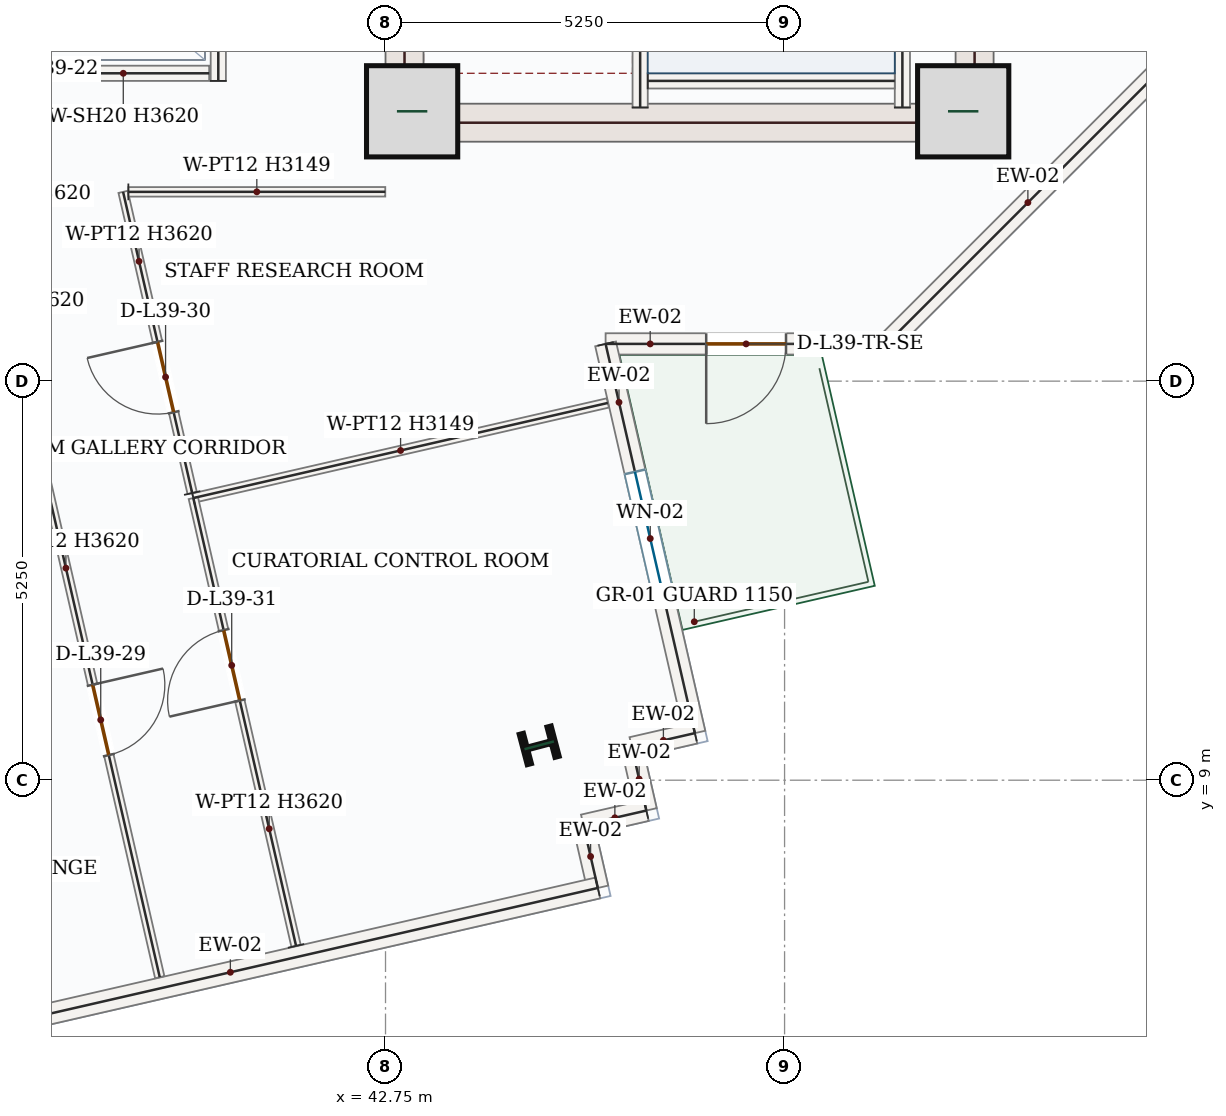
"""IFC4 building model, lengths in metres.
Left out: names, types, materials, properties, quantities, classifications, styles, units other than length and angle.
Written with IfcOpenShell. Run it as: python <this file> out.ifc"""

import sys

from ifc_helpers import new_model, si_unit, direction, frame, frame_2d, origin, origin_2d, place, context, subcontext, project, spatial, rectangle, i_section, extrude, source, transform, mapped, element, fill, save


model = new_model("IFC4")
c1 = context("Model", 3, precision=1e-05, world=origin(), true_north=direction((0.0, 1.0)))
c2 = subcontext(c1, "Body", "Model", "MODEL_VIEW")
j1 = project(units=[si_unit("LENGTHUNIT", "METRE"), si_unit("PLANEANGLEUNIT", "RADIAN")], contexts=[c1])
p1 = place(None, origin())
s1 = spatial("IfcSite", under=j1, at=p1, CompositionType="ELEMENT")
p2 = place(p1, origin())
s2 = spatial("IfcBuilding", under=s1, at=p2, CompositionType="ELEMENT")
p3 = place(p2, frame((0.0, 0.0, 170.7)))
s3 = spatial("IfcBuildingStorey", under=s2, at=p3, CompositionType="ELEMENT", Elevation=170.7)
p4 = place(p3, frame((43.0, 17.4, 0.0), z_axis=(0.0, 0.0, 1.0), x_axis=(0.0, 1.0, 0.0)))
e1 = element("IfcWall", 1, at=p4, inside=s3, PredefinedType="SHEAR", context=c2, shape_type="SweptSolid", body=[
    extrude(rectangle(XDim=8.55, YDim=0.5, at=frame_2d((4.275, 0.0))), origin(), (0.0, 0.0, 1.0), 3.62),
])
p5 = place(p4, frame((6.65, 0.0, 0.0)))
e2 = element("IfcOpeningElement", 2, at=p5, cuts=e1, PredefinedType="OPENING", context=c2, shape_type="SweptSolid", body=[
    extrude(rectangle(XDim=1.1, YDim=2.2, at=frame_2d((0.55, 1.1))), frame((0.0, 0.26, 0.0), z_axis=(0.0, -1.0, 0.0), x_axis=(1.0, 0.0, 0.0)), (0.0, 0.0, 1.0), 0.52),
])
p6 = place(p4, frame((1.75, 0.0, 0.0)))
e3 = element("IfcOpeningElement", 3, at=p6, cuts=e1, PredefinedType="OPENING", context=c2, shape_type="SweptSolid", body=[
    extrude(rectangle(XDim=1.3, YDim=2.2, at=frame_2d((0.65, 1.1))), frame((0.0, 0.26, 0.0), z_axis=(0.0, -1.0, 0.0), x_axis=(1.0, 0.0, 0.0)), (0.0, 0.0, 1.0), 0.52),
])
p7 = place(p4, frame((4.3, 0.0, 0.0)))
e4 = element("IfcOpeningElement", 4, at=p7, cuts=e1, PredefinedType="OPENING", context=c2, shape_type="SweptSolid", body=[
    extrude(rectangle(XDim=0.88, YDim=2.1, at=frame_2d((0.44, 1.05))), frame((0.0, 0.26, 0.0), z_axis=(0.0, -1.0, 0.0), x_axis=(1.0, 0.0, 0.0)), (0.0, 0.0, 1.0), 0.52),
])
m1 = source(origin(), c2, "Body", "SweptSolid", [
    extrude(rectangle(XDim=8.55, YDim=0.5, at=frame_2d((4.275, 0.0))), origin(), (0.0, 0.0, 1.0), 3.62),
])
p8 = place(p3, frame((50.5, 17.4, 0.0), z_axis=(0.0, 0.0, 1.0), x_axis=(0.0, 1.0, 0.0)))
e5 = element("IfcWall", 5, at=p8, inside=s3, PredefinedType="SHEAR", context=c2, shape_type="MappedRepresentation", body=[
    mapped(m1, transform((0.0, 0.0, 0.0), x_axis=(1.0, 0.0, 0.0), y_axis=(0.0, 1.0, 0.0), z_axis=(0.0, 0.0, 1.0), scale=1.0)),
])
m2 = source(origin(), c2, "Body", "SweptSolid", [
    extrude(rectangle(XDim=7.0, YDim=0.5, at=frame_2d((3.5, 0.0))), origin(), (0.0, 0.0, 1.0), 3.62),
])
p9 = place(p3, frame((43.25, 17.65, 0.0), z_axis=(0.0, 0.0, 1.0), x_axis=(1.0, 0.0, 0.0)))
e6 = element("IfcWall", 6, at=p9, inside=s3, PredefinedType="SHEAR", context=c2, shape_type="MappedRepresentation", body=[
    mapped(m2, transform((0.0, 0.0, 0.0), x_axis=(1.0, 0.0, 0.0), y_axis=(0.0, 1.0, 0.0), z_axis=(0.0, 0.0, 1.0), scale=1.0)),
])
m3 = source(origin(), c2, "Body", "SweptSolid", [
    extrude(rectangle(XDim=1.2, YDim=1.2, at=origin_2d()), origin(), (0.0, 0.0, 1.0), 3.9),
])
for number, where, z_axis, x_axis in (
    (7, (43.1, 17.8, 0.0), (0.0, 0.0, 1.0), (1.0, 0.0, 0.0)),
    (8, (50.35, 17.8, 0.0), (0.0, 0.0, 1.0), (1.0, 0.0, 0.0)),
):
    element("IfcColumn", number, at=place(p3, frame(where, z_axis=z_axis, x_axis=x_axis)), inside=s3, PredefinedType="COLUMN", context=c2, shape_type="MappedRepresentation", body=[
        mapped(m3, transform((0.0, 0.0, 0.0), x_axis=(1.0, 0.0, 0.0), y_axis=(0.0, 1.0, 0.0), z_axis=(0.0, 0.0, 1.0), scale=1.0)),
    ])
m4 = source(origin(), c2, "Body", "SweptSolid", [
    extrude(i_section(OverallWidth=0.412, OverallDepth=0.435, WebThickness=0.036, FlangeThickness=0.057, FilletRadius=0.018, at=origin_2d()), origin(), (0.0, 0.0, 1.0), 3.9),
])
p10 = place(p3, frame((44.772, 9.459, 0.0), z_axis=(0.0, 0.0, 1.0), x_axis=(-0.255445757936, 0.966823388604, 0.0)))
e9 = element("IfcColumn", 9, at=p10, inside=s3, PredefinedType="COLUMN", context=c2, shape_type="MappedRepresentation", body=[
    mapped(m4, transform((0.0, 0.0, 0.0), x_axis=(1.0, 0.0, 0.0), y_axis=(0.0, 1.0, 0.0), z_axis=(0.0, 0.0, 1.0), scale=1.0)),
])
m5 = source(origin(), c2, "Body", "SweptSolid", [
    extrude(rectangle(XDim=5.258, YDim=0.28, at=frame_2d((2.629, 0.0))), origin(), (0.0, 0.0, 1.0), 3.62),
])
p11 = place(p3, frame((53.06, 18.458, 0.0), z_axis=(0.0, 0.0, 1.0), x_axis=(-0.707106781187, -0.707106781187, 0.0)))
e10 = element("IfcWall", 10, at=p11, inside=s3, PredefinedType="SOLIDWALL", context=c2, shape_type="MappedRepresentation", body=[
    mapped(m5, transform((0.0, 0.0, 0.0), x_axis=(1.0, 0.0, 0.0), y_axis=(0.0, 1.0, 0.0), z_axis=(0.0, 0.0, 1.0), scale=1.0)),
])
p12 = place(p3, frame((49.342, 14.74, 0.0), z_axis=(0.0, 0.0, 1.0), x_axis=(-1.0, 0.0, 0.0)))
e11 = element("IfcWall", 11, at=p12, inside=s3, PredefinedType="SOLIDWALL", context=c2, shape_type="SweptSolid", body=[
    extrude(rectangle(XDim=3.697, YDim=0.28, at=frame_2d((1.848, 0.0))), origin(), (0.0, 0.0, 1.0), 3.62),
])
p13 = place(p12, frame((1.323, 0.0, 0.0)))
e12 = element("IfcOpeningElement", 12, at=p13, cuts=e11, PredefinedType="OPENING", context=c2, shape_type="SweptSolid", body=[
    extrude(rectangle(XDim=1.05, YDim=2.15, at=frame_2d((0.525, 1.075))), frame((0.0, 0.15, 0.0), z_axis=(0.0, -1.0, 0.0), x_axis=(1.0, 0.0, 0.0)), (0.0, 0.0, 1.0), 0.3),
])
p14 = place(p3, frame((45.646, 14.74, 0.0), z_axis=(0.0, 0.0, 1.0), x_axis=(0.223562871808, -0.974689510741, 0.0)))
e13 = element("IfcWall", 13, at=p14, inside=s3, PredefinedType="SOLIDWALL", context=c2, shape_type="SweptSolid", body=[
    extrude(rectangle(XDim=5.254, YDim=0.28, at=frame_2d((2.627, 0.0))), origin(), (0.0, 0.0, 1.0), 3.62),
])
p15 = place(p14, frame((1.727, 0.0, 0.85)))
e14 = element("IfcOpeningElement", 14, at=p15, cuts=e13, PredefinedType="OPENING", context=c2, shape_type="SweptSolid", body=[
    extrude(rectangle(XDim=1.8, YDim=1.75, at=frame_2d((0.9, 0.875))), frame((0.0, 0.15, 0.0), z_axis=(0.0, -1.0, 0.0), x_axis=(1.0, 0.0, 0.0)), (0.0, 0.0, 1.0), 0.3),
])
m6 = source(origin(), c2, "Body", "SweptSolid", [
    extrude(rectangle(XDim=0.85, YDim=0.28, at=frame_2d((0.425, 0.0))), origin(), (0.0, 0.0, 1.0), 3.62),
])
p16 = place(p3, frame((46.82, 9.619, 0.0), z_axis=(0.0, 0.0, 1.0), x_axis=(-0.974704946586, -0.223495563939, 0.0)))
e15 = element("IfcWall", 15, at=p16, inside=s3, PredefinedType="SOLIDWALL", context=c2, shape_type="MappedRepresentation", body=[
    mapped(m6, transform((0.0, 0.0, 0.0), x_axis=(1.0, 0.0, 0.0), y_axis=(0.0, 1.0, 0.0), z_axis=(0.0, 0.0, 1.0), scale=1.0)),
])
m7 = source(origin(), c2, "Body", "SweptSolid", [
    extrude(rectangle(XDim=0.85, YDim=0.28, at=frame_2d((0.425, 0.0))), origin(), (0.0, 0.0, 1.0), 3.62),
])
for number, where, z_axis, x_axis in (
    (16, (45.992, 9.429, 0.0), (0.0, 0.0, 1.0), (0.223, -0.975, 0.0)),
    (17, (46.182, 8.601, 0.0), (0.0, 0.0, 1.0), (-0.975, -0.223, 0.0)),
):
    element("IfcWall", number, at=place(p3, frame(where, z_axis=z_axis, x_axis=x_axis)), inside=s3, PredefinedType="SOLIDWALL", context=c2, shape_type="MappedRepresentation", body=[
        mapped(m7, transform((0.0, 0.0, 0.0), x_axis=(1.0, 0.0, 0.0), y_axis=(0.0, 1.0, 0.0), z_axis=(0.0, 0.0, 1.0), scale=1.0)),
    ])
p17 = place(p3, frame((45.353, 8.411, 0.0), z_axis=(0.0, 0.0, 1.0), x_axis=(0.223768457828, -0.974642333003, 0.0)))
e18 = element("IfcWall", 18, at=p17, inside=s3, PredefinedType="SOLIDWALL", context=c2, shape_type="MappedRepresentation", body=[
    mapped(m6, transform((0.0, 0.0, 0.0), x_axis=(1.0, 0.0, 0.0), y_axis=(0.0, 1.0, 0.0), z_axis=(0.0, 0.0, 1.0), scale=1.0)),
])
m8 = source(origin(), c2, "Body", "SweptSolid", [
    extrude(rectangle(XDim=9.92, YDim=0.28, at=frame_2d((4.96, 0.0))), origin(), (0.0, 0.0, 1.0), 3.62),
])
p18 = place(p3, frame((45.543, 7.582, 0.0), z_axis=(0.0, 0.0, 1.0), x_axis=(-0.974682391567, -0.223593907719, 0.0)))
e19 = element("IfcWall", 19, at=p18, inside=s3, PredefinedType="SOLIDWALL", context=c2, shape_type="MappedRepresentation", body=[
    mapped(m8, transform((0.0, 0.0, 0.0), x_axis=(1.0, 0.0, 0.0), y_axis=(0.0, 1.0, 0.0), z_axis=(0.0, 0.0, 1.0), scale=1.0)),
])
m9 = source(origin(), c2, "Body", "SweptSolid", [
    extrude(rectangle(XDim=7.87, YDim=0.2, at=frame_2d((3.935, 0.0))), origin(), (0.0, 0.0, 1.0), 3.62),
])
p19 = place(p3, frame((49.55, 17.85, 0.0), z_axis=(0.0, 0.0, 1.0), x_axis=(0.0, 1.0, 0.0)))
e20 = element("IfcWall", 20, at=p19, inside=s3, PredefinedType="SOLIDWALL", context=c2, shape_type="MappedRepresentation", body=[
    mapped(m9, transform((0.0, 0.0, 0.0), x_axis=(1.0, 0.0, 0.0), y_axis=(0.0, 1.0, 0.0), z_axis=(0.0, 0.0, 1.0), scale=1.0)),
])
p20 = place(p3, frame((46.1, 17.85, 0.0), z_axis=(0.0, 0.0, 1.0), x_axis=(0.0, 1.0, 0.0)))
e21 = element("IfcWall", 21, at=p20, inside=s3, PredefinedType="SOLIDWALL", context=c2, shape_type="SweptSolid", body=[
    extrude(rectangle(XDim=8.0, YDim=0.2, at=frame_2d((4.0, 0.0))), origin(), (0.0, 0.0, 1.0), 3.62),
])
p21 = place(p20, frame((6.3, 0.0, 0.0)))
e22 = element("IfcOpeningElement", 22, at=p21, cuts=e21, PredefinedType="OPENING", context=c2, shape_type="SweptSolid", body=[
    extrude(rectangle(XDim=1.05, YDim=2.15, at=frame_2d((0.525, 1.075))), frame((0.0, 0.11, 0.0), z_axis=(0.0, -1.0, 0.0), x_axis=(1.0, 0.0, 0.0)), (0.0, 0.0, 1.0), 0.22),
])
m10 = source(origin(), c2, "Body", "SweptSolid", [
    extrude(rectangle(XDim=3.25, YDim=0.2, at=frame_2d((1.625, 0.0))), origin(), (0.0, 0.0, 1.0), 3.62),
])
p22 = place(p3, frame((46.2, 18.2, 0.0), z_axis=(0.0, 0.0, 1.0), x_axis=(1.0, 0.0, 0.0)))
e23 = element("IfcWall", 23, at=p22, inside=s3, PredefinedType="SOLIDWALL", context=c2, shape_type="MappedRepresentation", body=[
    mapped(m10, transform((0.0, 0.0, 0.0), x_axis=(1.0, 0.0, 0.0), y_axis=(0.0, 1.0, 0.0), z_axis=(0.0, 0.0, 1.0), scale=1.0)),
])
p23 = place(p3, frame((40.55, 18.2, 0.0), z_axis=(0.0, 0.0, 1.0), x_axis=(0.0, 1.0, 0.0)))
e24 = element("IfcWall", 24, at=p23, inside=s3, PredefinedType="SOLIDWALL", context=c2, shape_type="SweptSolid", body=[
    extrude(rectangle(XDim=2.35, YDim=0.2, at=frame_2d((1.175, 0.0))), origin(), (0.0, 0.0, 1.0), 3.62),
])
p24 = place(p23, frame((0.625, 0.0, 0.0)))
e25 = element("IfcOpeningElement", 25, at=p24, cuts=e24, PredefinedType="OPENING", context=c2, shape_type="SweptSolid", body=[
    extrude(rectangle(XDim=1.1, YDim=2.15, at=frame_2d((0.55, 1.075))), frame((0.0, 0.11, 0.0), z_axis=(0.0, -1.0, 0.0), x_axis=(1.0, 0.0, 0.0)), (0.0, 0.0, 1.0), 0.22),
])
m11 = source(origin(), c2, "Body", "SweptSolid", [
    extrude(rectangle(XDim=2.26, YDim=0.2, at=frame_2d((1.13, 0.0))), origin(), (0.0, 0.0, 1.0), 3.62),
])
p25 = place(p3, frame((38.17, 18.3, 0.0), z_axis=(0.0, 0.0, 1.0), x_axis=(1.0, 0.0, 0.0)))
e26 = element("IfcWall", 26, at=p25, inside=s3, PredefinedType="SOLIDWALL", context=c2, shape_type="MappedRepresentation", body=[
    mapped(m11, transform((0.0, 0.0, 0.0), x_axis=(1.0, 0.0, 0.0), y_axis=(0.0, 1.0, 0.0), z_axis=(0.0, 0.0, 1.0), scale=1.0)),
])
m12 = source(origin(), c2, "Body", "SweptSolid", [
    extrude(rectangle(XDim=5.595, YDim=0.125, at=frame_2d((2.797, 0.0))), origin(), (0.0, 0.0, 1.0), 3.149),
])
p26 = place(p3, frame((40.221, 12.712, 0.0), z_axis=(0.0, 0.0, 1.0), x_axis=(0.974683801791, 0.223587760235, 0.0)))
e27 = element("IfcWall", 27, at=p26, inside=s3, PredefinedType="PARTITIONING", context=c2, shape_type="MappedRepresentation", body=[
    mapped(m12, transform((0.0, 0.0, 0.0), x_axis=(1.0, 0.0, 0.0), y_axis=(0.0, 1.0, 0.0), z_axis=(0.0, 0.0, 1.0), scale=1.0)),
])
p27 = place(p3, frame((41.573, 6.82, 0.0), z_axis=(0.0, 0.0, 1.0), x_axis=(-0.223588000718, 0.974683746625, 0.0)))
e28 = element("IfcWall", 28, at=p27, inside=s3, PredefinedType="PARTITIONING", context=c2, shape_type="SweptSolid", body=[
    extrude(rectangle(XDim=6.045, YDim=0.125, at=frame_2d((3.022, 0.0))), origin(), (0.0, 0.0, 1.0), 3.62),
])
p28 = place(p27, frame((3.312, 0.0, 0.0)))
e29 = element("IfcOpeningElement", 29, at=p28, cuts=e28, PredefinedType="OPENING", context=c2, shape_type="SweptSolid", body=[
    extrude(rectangle(XDim=0.95, YDim=2.15, at=frame_2d((0.475, 1.075))), frame((0.0, 0.073, 0.0), z_axis=(0.0, -1.0, 0.0), x_axis=(1.0, 0.0, 0.0)), (0.0, 0.0, 1.0), 0.145),
])
p29 = place(p3, frame((40.206, 12.778, 0.0), z_axis=(0.0, 0.0, 1.0), x_axis=(-0.223552104445, 0.97469198037, 0.0)))
e30 = element("IfcWall", 30, at=p29, inside=s3, PredefinedType="PARTITIONING", context=c2, shape_type="SweptSolid", body=[
    extrude(rectangle(XDim=4.065, YDim=0.125, at=frame_2d((2.032, 0.0))), origin(), (0.0, 0.0, 1.0), 3.62),
])
p30 = place(p29, frame((1.09, 0.0, 0.0)))
e31 = element("IfcOpeningElement", 31, at=p30, cuts=e30, PredefinedType="OPENING", context=c2, shape_type="SweptSolid", body=[
    extrude(rectangle(XDim=0.95, YDim=2.15, at=frame_2d((0.475, 1.075))), frame((0.0, 0.073, 0.0), z_axis=(0.0, -1.0, 0.0), x_axis=(1.0, 0.0, 0.0)), (0.0, 0.0, 1.0), 0.145),
])
m13 = source(origin(), c2, "Body", "SweptSolid", [
    extrude(rectangle(XDim=3.38, YDim=0.125, at=frame_2d((1.69, 0.0))), origin(), (0.0, 0.0, 1.0), 3.149),
])
p31 = place(p3, frame((39.367, 16.74, 0.0), z_axis=(0.0, 0.0, 1.0), x_axis=(0.999999934779, 0.000361167269, 0.0)))
e32 = element("IfcWall", 32, at=p31, inside=s3, PredefinedType="PARTITIONING", context=c2, shape_type="MappedRepresentation", body=[
    mapped(m13, transform((0.0, 0.0, 0.0), x_axis=(1.0, 0.0, 0.0), y_axis=(0.0, 1.0, 0.0), z_axis=(0.0, 0.0, 1.0), scale=1.0)),
])
p32 = place(p3, frame((38.227, 13.178, 0.0), z_axis=(0.0, 0.0, 1.0), x_axis=(0.223573066544, -0.974687172336, 0.0)))
e33 = element("IfcWall", 33, at=p32, inside=s3, PredefinedType="PARTITIONING", context=c2, shape_type="SweptSolid", body=[
    extrude(rectangle(XDim=6.945, YDim=0.125, at=frame_2d((3.473, 0.0))), origin(), (0.0, 0.0, 1.0), 3.62),
])
p33 = place(p32, frame((2.998, 0.0, 0.0)))
e34 = element("IfcOpeningElement", 34, at=p33, cuts=e33, PredefinedType="OPENING", context=c2, shape_type="SweptSolid", body=[
    extrude(rectangle(XDim=0.95, YDim=2.15, at=frame_2d((0.475, 1.075))), frame((0.0, 0.073, 0.0), z_axis=(0.0, -1.0, 0.0), x_axis=(1.0, 0.0, 0.0)), (0.0, 0.0, 1.0), 0.145),
])
m14 = source(origin(), c2, "Body", "SweptSolid", [
    extrude(rectangle(XDim=1.05, YDim=2.15, at=frame_2d((0.525, 1.075))), frame((0.0, 0.025, 0.0), z_axis=(0.0, -1.0, 0.0), x_axis=(1.0, 0.0, 0.0)), (0.0, 0.0, 1.0), 0.05),
])
p34 = place(p13, origin())
e35 = element("IfcDoor", 35, at=p34, inside=s3, OperationType="SINGLE_SWING_RIGHT", PredefinedType="DOOR", context=c2, shape_type="MappedRepresentation", body=[
    mapped(m14, transform((0.0, 0.0, 0.0), x_axis=(1.0, 0.0, 0.0), y_axis=(0.0, 1.0, 0.0), z_axis=(0.0, 0.0, 1.0), scale=1.0)),
])
fill(e12, e35)
m15 = source(origin(), c2, "Body", "SweptSolid", [
    extrude(rectangle(XDim=1.8, YDim=1.75, at=frame_2d((0.9, 0.875))), frame((0.0, 0.03, 0.0), z_axis=(0.0, -1.0, 0.0), x_axis=(1.0, 0.0, 0.0)), (0.0, 0.0, 1.0), 0.06),
])
p35 = place(p15, origin())
e36 = element("IfcWindow", 36, at=p35, inside=s3, PartitioningType="DOUBLE_PANEL_VERTICAL", PredefinedType="WINDOW", context=c2, shape_type="MappedRepresentation", body=[
    mapped(m15, transform((0.0, 0.0, 0.0), x_axis=(1.0, 0.0, 0.0), y_axis=(0.0, 1.0, 0.0), z_axis=(0.0, 0.0, 1.0), scale=1.0)),
])
fill(e14, e36)
m16 = source(origin(), c2, "Body", "SweptSolid", [
    extrude(rectangle(XDim=0.95, YDim=2.15, at=frame_2d((0.475, 1.075))), frame((0.0, 0.025, 0.0), z_axis=(0.0, -1.0, 0.0), x_axis=(1.0, 0.0, 0.0)), (0.0, 0.0, 1.0), 0.05),
])
p36 = place(p33, origin())
e37 = element("IfcDoor", 37, at=p36, inside=s3, OperationType="SINGLE_SWING_LEFT", PredefinedType="DOOR", context=c2, shape_type="MappedRepresentation", body=[
    mapped(m16, transform((0.0, 0.0, 0.0), x_axis=(1.0, 0.0, 0.0), y_axis=(0.0, 1.0, 0.0), z_axis=(0.0, 0.0, 1.0), scale=1.0)),
])
fill(e34, e37)
p37 = place(p30, origin())
e38 = element("IfcDoor", 38, at=p37, inside=s3, OperationType="SINGLE_SWING_RIGHT", PredefinedType="DOOR", context=c2, shape_type="MappedRepresentation", body=[
    mapped(m16, transform((0.0, 0.0, 0.0), x_axis=(1.0, 0.0, 0.0), y_axis=(0.0, 1.0, 0.0), z_axis=(0.0, 0.0, 1.0), scale=1.0)),
])
fill(e31, e38)
p38 = place(p28, origin())
e39 = element("IfcDoor", 39, at=p38, inside=s3, OperationType="SINGLE_SWING_LEFT", PredefinedType="DOOR", context=c2, shape_type="MappedRepresentation", body=[
    mapped(m16, transform((0.0, 0.0, 0.0), x_axis=(1.0, 0.0, 0.0), y_axis=(0.0, 1.0, 0.0), z_axis=(0.0, 0.0, 1.0), scale=1.0)),
])
fill(e29, e39)
save(model, sys.argv[1])
